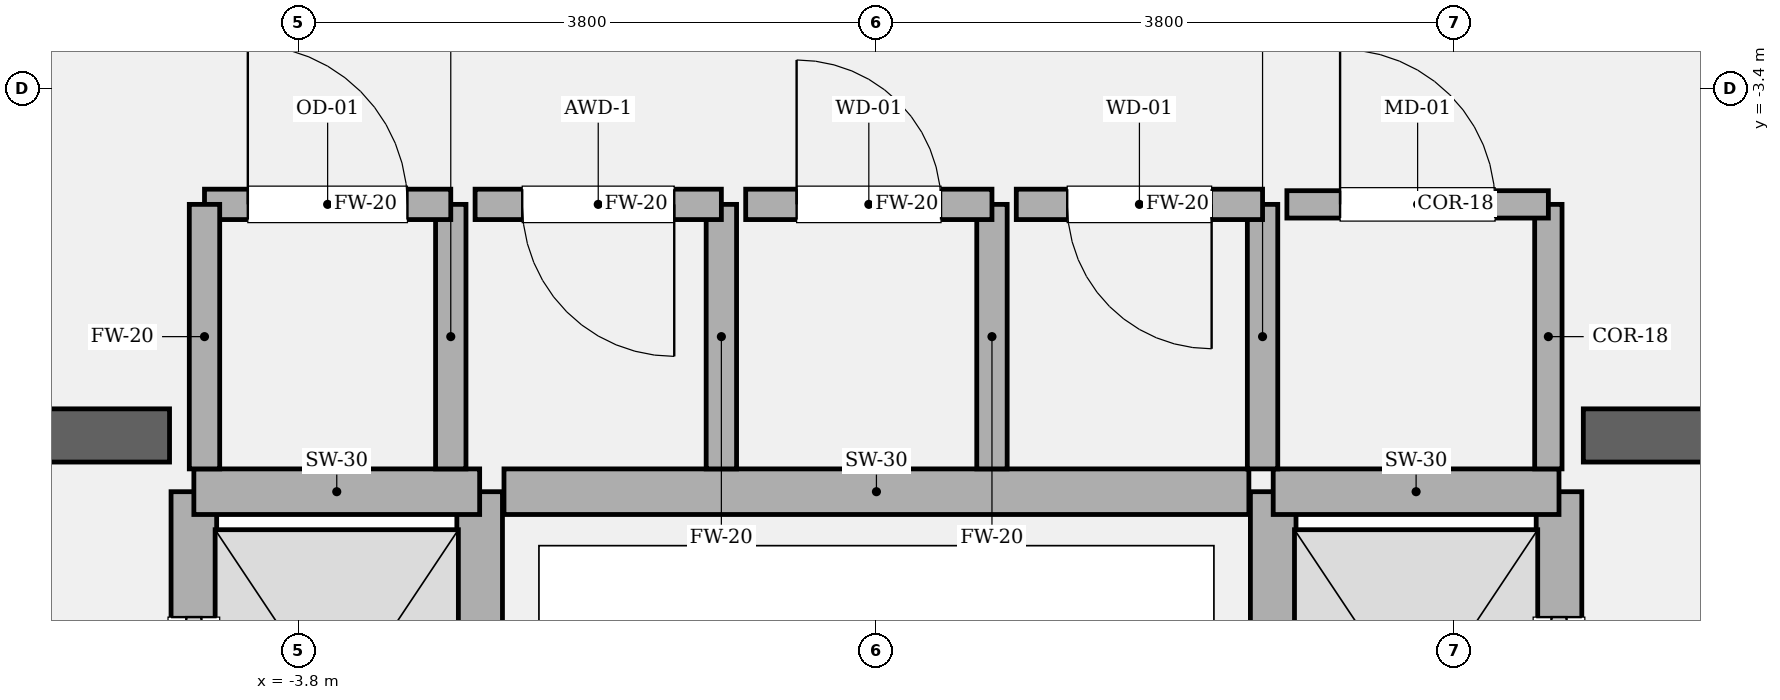
"""IFC4 building model, lengths in metres.
Left out: names, types, materials, properties, quantities, classifications, styles, units other than length and angle.
Written with IfcOpenShell. Run it as: python <this file> out.ifc"""

import sys

from ifc_helpers import new_model, si_unit, direction, frame, frame_2d, origin, place, context, subcontext, project, spatial, rectangle, extrude, element, fill, save


model = new_model("IFC4")
c1 = context("Model", 3, precision=1e-05, world=origin(), true_north=direction((0.0, 1.0)))
c2 = subcontext(c1, "Body", "Model", "MODEL_VIEW")
j1 = project(units=[si_unit("LENGTHUNIT", "METRE"), si_unit("PLANEANGLEUNIT", "RADIAN")], contexts=[c1])
p1 = place(None, origin())
s1 = spatial("IfcSite", under=j1, at=p1, CompositionType="ELEMENT")
p2 = place(p1, origin())
s2 = spatial("IfcBuilding", under=s1, at=p2, CompositionType="ELEMENT")
p3 = place(p2, frame((0.0, 0.0, 80.85)))
s3 = spatial("IfcBuildingStorey", under=s2, at=p3, CompositionType="ELEMENT", Elevation=80.85)
p4 = place(p3, frame((-9.825, -5.68, 0.0), z_axis=(0.0, 0.0, 1.0), x_axis=(1.0, 0.0, 0.0)))
e1 = element("IfcWall", 1, at=p4, inside=s3, PredefinedType="SOLIDWALL", context=c2, shape_type="SweptSolid", body=[
    extrude(rectangle(XDim=5.175, YDim=0.35, at=frame_2d((2.587, 0.0))), origin(), (0.0, 0.0, 1.0), 4.05),
])
p5 = place(p4, frame((1.285, 0.0, 0.0)))
e2 = element("IfcOpeningElement", 2, at=p5, cuts=e1, PredefinedType="OPENING", context=c2, shape_type="SweptSolid", body=[
    extrude(rectangle(XDim=1.18, YDim=2.2, at=frame_2d((0.59, 1.1))), frame((0.0, 0.185, 0.0), z_axis=(0.0, -1.0, 0.0), x_axis=(1.0, 0.0, 0.0)), (0.0, 0.0, 1.0), 0.37),
])
p6 = place(p3, frame((4.65, -5.68, 0.0), z_axis=(0.0, 0.0, 1.0), x_axis=(1.0, 0.0, 0.0)))
e3 = element("IfcWall", 3, at=p6, inside=s3, PredefinedType="SOLIDWALL", context=c2, shape_type="SweptSolid", body=[
    extrude(rectangle(XDim=5.175, YDim=0.35, at=frame_2d((2.587, 0.0))), origin(), (0.0, 0.0, 1.0), 4.05),
])
p7 = place(p6, frame((2.71, 0.0, 0.0)))
e4 = element("IfcOpeningElement", 4, at=p7, cuts=e3, PredefinedType="OPENING", context=c2, shape_type="SweptSolid", body=[
    extrude(rectangle(XDim=1.18, YDim=2.2, at=frame_2d((0.59, 1.1))), frame((0.0, 0.185, 0.0), z_axis=(0.0, -1.0, 0.0), x_axis=(1.0, 0.0, 0.0)), (0.0, 0.0, 1.0), 0.37),
])
p8 = place(p3, frame((-4.49, -8.82, 0.0), z_axis=(0.0, 0.0, 1.0), x_axis=(0.0, 1.0, 0.0)))
e5 = element("IfcWall", 5, at=p8, inside=s3, PredefinedType="SOLIDWALL", context=c2, shape_type="SweptSolid", body=[
    extrude(rectangle(XDim=2.77, YDim=0.3, at=frame_2d((1.385, 0.0))), origin(), (0.0, 0.0, 1.0), 3.81),
])
p9 = place(p8, frame((0.825, 0.0, 0.0)))
e6 = element("IfcOpeningElement", 6, at=p9, cuts=e5, PredefinedType="OPENING", context=c2, shape_type="SweptSolid", body=[
    extrude(rectangle(XDim=1.12, YDim=2.25, at=frame_2d((0.56, 1.125))), frame((0.0, 0.16, 0.0), z_axis=(0.0, -1.0, 0.0), x_axis=(1.0, 0.0, 0.0)), (0.0, 0.0, 1.0), 0.32),
])
p10 = place(p3, frame((-2.61, -8.82, 0.0), z_axis=(0.0, 0.0, 1.0), x_axis=(0.0, 1.0, 0.0)))
e7 = element("IfcWall", 7, at=p10, inside=s3, PredefinedType="SOLIDWALL", context=c2, shape_type="SweptSolid", body=[
    extrude(rectangle(XDim=2.77, YDim=0.3, at=frame_2d((1.385, 0.0))), origin(), (0.0, 0.0, 1.0), 3.81),
])
p11 = place(p3, frame((-4.49, -6.05, 0.0), z_axis=(0.0, 0.0, 1.0), x_axis=(1.0, 0.0, 0.0)))
e8 = element("IfcWall", 8, at=p11, inside=s3, PredefinedType="SOLIDWALL", context=c2, shape_type="SweptSolid", body=[
    extrude(rectangle(XDim=1.88, YDim=0.3, at=frame_2d((0.94, 0.0))), origin(), (0.0, 0.0, 1.0), 3.81),
])
p12 = place(p3, frame((4.49, -8.82, 0.0), z_axis=(0.0, 0.0, 1.0), x_axis=(0.0, 1.0, 0.0)))
e9 = element("IfcWall", 9, at=p12, inside=s3, PredefinedType="SOLIDWALL", context=c2, shape_type="SweptSolid", body=[
    extrude(rectangle(XDim=2.77, YDim=0.3, at=frame_2d((1.385, 0.0))), origin(), (0.0, 0.0, 1.0), 3.81),
])
p13 = place(p12, frame((0.825, 0.0, 0.0)))
e10 = element("IfcOpeningElement", 10, at=p13, cuts=e9, PredefinedType="OPENING", context=c2, shape_type="SweptSolid", body=[
    extrude(rectangle(XDim=1.12, YDim=2.25, at=frame_2d((0.56, 1.125))), frame((0.0, 0.16, 0.0), z_axis=(0.0, -1.0, 0.0), x_axis=(1.0, 0.0, 0.0)), (0.0, 0.0, 1.0), 0.32),
])
p14 = place(p3, frame((2.61, -8.82, 0.0), z_axis=(0.0, 0.0, 1.0), x_axis=(0.0, 1.0, 0.0)))
e11 = element("IfcWall", 11, at=p14, inside=s3, PredefinedType="SOLIDWALL", context=c2, shape_type="SweptSolid", body=[
    extrude(rectangle(XDim=2.77, YDim=0.3, at=frame_2d((1.385, 0.0))), origin(), (0.0, 0.0, 1.0), 3.81),
])
p15 = place(p3, frame((2.61, -6.05, 0.0), z_axis=(0.0, 0.0, 1.0), x_axis=(1.0, 0.0, 0.0)))
e12 = element("IfcWall", 12, at=p15, inside=s3, PredefinedType="SOLIDWALL", context=c2, shape_type="SweptSolid", body=[
    extrude(rectangle(XDim=1.88, YDim=0.3, at=frame_2d((0.94, 0.0))), origin(), (0.0, 0.0, 1.0), 3.81),
])
p16 = place(p3, frame((-2.45, -6.05, 0.0), z_axis=(0.0, 0.0, 1.0), x_axis=(1.0, 0.0, 0.0)))
e13 = element("IfcWall", 13, at=p16, inside=s3, PredefinedType="SOLIDWALL", context=c2, shape_type="SweptSolid", body=[
    extrude(rectangle(XDim=4.9, YDim=0.3, at=frame_2d((2.45, 0.0))), origin(), (0.0, 0.0, 1.0), 3.81),
])
p17 = place(p3, frame((-2.8, -5.9, 0.0), z_axis=(0.0, 0.0, 1.0), x_axis=(0.0, 1.0, 0.0)))
e14 = element("IfcWall", 14, at=p17, inside=s3, PredefinedType="SOLIDWALL", context=c2, shape_type="SweptSolid", body=[
    extrude(rectangle(XDim=1.74, YDim=0.2, at=frame_2d((0.87, 0.0))), origin(), (0.0, 0.0, 1.0), 3.81),
])
p18 = place(p3, frame((-2.8, -4.16, 0.0), z_axis=(0.0, 0.0, 1.0), x_axis=(-1.0, 0.0, 0.0)))
e15 = element("IfcWall", 15, at=p18, inside=s3, PredefinedType="SOLIDWALL", context=c2, shape_type="SweptSolid", body=[
    extrude(rectangle(XDim=1.62, YDim=0.2, at=frame_2d((0.81, 0.0))), origin(), (0.0, 0.0, 1.0), 3.81),
])
p19 = place(p18, frame((0.285, 0.0, 0.0)))
e16 = element("IfcOpeningElement", 16, at=p19, cuts=e15, PredefinedType="OPENING", context=c2, shape_type="SweptSolid", body=[
    extrude(rectangle(XDim=1.05, YDim=2.2, at=frame_2d((0.525, 1.1))), frame((0.0, 0.11, 0.0), z_axis=(0.0, -1.0, 0.0), x_axis=(1.0, 0.0, 0.0)), (0.0, 0.0, 1.0), 0.22),
])
for number, where, z_axis, x_axis in (
    (17, (-4.42, -4.16, 0.0), (0.0, 0.0, 1.0), (0.0, -1.0, 0.0)),
    (18, (-1.02, -5.9, 0.0), (0.0, 0.0, 1.0), (0.0, 1.0, 0.0)),
):
    element("IfcWall", number, at=place(p3, frame(where, z_axis=z_axis, x_axis=x_axis)), inside=s3, PredefinedType="SOLIDWALL", context=c2, shape_type="SweptSolid", body=[
        extrude(rectangle(XDim=1.74, YDim=0.2, at=frame_2d((0.87, 0.0))), origin(), (0.0, 0.0, 1.0), 3.81),
    ])
p20 = place(p3, frame((-1.02, -4.16, 0.0), z_axis=(0.0, 0.0, 1.0), x_axis=(-1.0, 0.0, 0.0)))
e19 = element("IfcWall", 19, at=p20, inside=s3, PredefinedType="SOLIDWALL", context=c2, shape_type="SweptSolid", body=[
    extrude(rectangle(XDim=1.62, YDim=0.2, at=frame_2d((0.81, 0.0))), origin(), (0.0, 0.0, 1.0), 3.81),
])
p21 = place(p20, frame((0.31, 0.0, 0.0)))
e20 = element("IfcOpeningElement", 20, at=p21, cuts=e19, PredefinedType="OPENING", context=c2, shape_type="SweptSolid", body=[
    extrude(rectangle(XDim=1.0, YDim=2.15, at=frame_2d((0.5, 1.075))), frame((0.0, 0.11, 0.0), z_axis=(0.0, -1.0, 0.0), x_axis=(1.0, 0.0, 0.0)), (0.0, 0.0, 1.0), 0.22),
])
p22 = place(p3, frame((0.76, -5.9, 0.0), z_axis=(0.0, 0.0, 1.0), x_axis=(0.0, 1.0, 0.0)))
e21 = element("IfcWall", 21, at=p22, inside=s3, PredefinedType="SOLIDWALL", context=c2, shape_type="SweptSolid", body=[
    extrude(rectangle(XDim=1.74, YDim=0.2, at=frame_2d((0.87, 0.0))), origin(), (0.0, 0.0, 1.0), 3.81),
])
p23 = place(p3, frame((0.76, -4.16, 0.0), z_axis=(0.0, 0.0, 1.0), x_axis=(-1.0, 0.0, 0.0)))
e22 = element("IfcWall", 22, at=p23, inside=s3, PredefinedType="SOLIDWALL", context=c2, shape_type="SweptSolid", body=[
    extrude(rectangle(XDim=1.62, YDim=0.2, at=frame_2d((0.81, 0.0))), origin(), (0.0, 0.0, 1.0), 3.81),
])
p24 = place(p23, frame((0.335, 0.0, 0.0)))
e23 = element("IfcOpeningElement", 23, at=p24, cuts=e22, PredefinedType="OPENING", context=c2, shape_type="SweptSolid", body=[
    extrude(rectangle(XDim=0.95, YDim=2.15, at=frame_2d((0.475, 1.075))), frame((0.0, 0.11, 0.0), z_axis=(0.0, -1.0, 0.0), x_axis=(1.0, 0.0, 0.0)), (0.0, 0.0, 1.0), 0.22),
])
p25 = place(p3, frame((2.54, -5.9, 0.0), z_axis=(0.0, 0.0, 1.0), x_axis=(0.0, 1.0, 0.0)))
e24 = element("IfcWall", 24, at=p25, inside=s3, PredefinedType="SOLIDWALL", context=c2, shape_type="SweptSolid", body=[
    extrude(rectangle(XDim=1.74, YDim=0.2, at=frame_2d((0.87, 0.0))), origin(), (0.0, 0.0, 1.0), 3.81),
])
p26 = place(p3, frame((2.54, -4.16, 0.0), z_axis=(0.0, 0.0, 1.0), x_axis=(-1.0, 0.0, 0.0)))
e25 = element("IfcWall", 25, at=p26, inside=s3, PredefinedType="SOLIDWALL", context=c2, shape_type="SweptSolid", body=[
    extrude(rectangle(XDim=1.62, YDim=0.2, at=frame_2d((0.81, 0.0))), origin(), (0.0, 0.0, 1.0), 3.81),
])
p27 = place(p26, frame((0.335, 0.0, 0.0)))
e26 = element("IfcOpeningElement", 26, at=p27, cuts=e25, PredefinedType="OPENING", context=c2, shape_type="SweptSolid", body=[
    extrude(rectangle(XDim=0.95, YDim=2.15, at=frame_2d((0.475, 1.075))), frame((0.0, 0.11, 0.0), z_axis=(0.0, -1.0, 0.0), x_axis=(1.0, 0.0, 0.0)), (0.0, 0.0, 1.0), 0.22),
])
p28 = place(p3, frame((4.42, -5.9, 0.0), z_axis=(0.0, 0.0, 1.0), x_axis=(0.0, 1.0, 0.0)))
e27 = element("IfcWall", 27, at=p28, inside=s3, PredefinedType="PARTITIONING", context=c2, shape_type="SweptSolid", body=[
    extrude(rectangle(XDim=1.74, YDim=0.18, at=frame_2d((0.87, 0.0))), origin(), (0.0, 0.0, 1.0), 3.81),
])
p29 = place(p3, frame((4.42, -4.16, 0.0), z_axis=(0.0, 0.0, 1.0), x_axis=(-1.0, 0.0, 0.0)))
e28 = element("IfcWall", 28, at=p29, inside=s3, PredefinedType="PARTITIONING", context=c2, shape_type="SweptSolid", body=[
    extrude(rectangle(XDim=1.72, YDim=0.18, at=frame_2d((0.86, 0.0))), origin(), (0.0, 0.0, 1.0), 3.81),
])
p30 = place(p29, frame((0.35, 0.0, 0.0)))
e29 = element("IfcOpeningElement", 29, at=p30, cuts=e28, PredefinedType="OPENING", context=c2, shape_type="SweptSolid", body=[
    extrude(rectangle(XDim=1.02, YDim=2.2, at=frame_2d((0.51, 1.1))), frame((0.0, 0.1, 0.0), z_axis=(0.0, -1.0, 0.0), x_axis=(1.0, 0.0, 0.0)), (0.0, 0.0, 1.0), 0.2),
])
p31 = place(p9, origin())
e30 = element("IfcDoor", 30, at=p31, inside=s3, OperationType="SLIDING_TO_LEFT", PredefinedType="DOOR", context=c2, shape_type="SweptSolid", body=[
    extrude(rectangle(XDim=1.12, YDim=2.25, at=frame_2d((0.56, 1.125))), frame((0.0, 0.025, 0.0), z_axis=(0.0, -1.0, 0.0), x_axis=(1.0, 0.0, 0.0)), (0.0, 0.0, 1.0), 0.05),
])
fill(e6, e30)
p32 = place(p13, origin())
e31 = element("IfcDoor", 31, at=p32, inside=s3, OperationType="SLIDING_TO_RIGHT", PredefinedType="DOOR", context=c2, shape_type="SweptSolid", body=[
    extrude(rectangle(XDim=1.12, YDim=2.25, at=frame_2d((0.56, 1.125))), frame((0.0, 0.025, 0.0), z_axis=(0.0, -1.0, 0.0), x_axis=(1.0, 0.0, 0.0)), (0.0, 0.0, 1.0), 0.05),
])
fill(e10, e31)
p33 = place(p19, origin())
e32 = element("IfcDoor", 32, at=p33, inside=s3, OperationType="SINGLE_SWING_RIGHT", PredefinedType="DOOR", context=c2, shape_type="SweptSolid", body=[
    extrude(rectangle(XDim=1.05, YDim=2.2, at=frame_2d((0.525, 1.1))), frame((0.0, 0.025, 0.0), z_axis=(0.0, -1.0, 0.0), x_axis=(1.0, 0.0, 0.0)), (0.0, 0.0, 1.0), 0.05),
])
fill(e16, e32)
p34 = place(p21, origin())
e33 = element("IfcDoor", 33, at=p34, inside=s3, OperationType="SINGLE_SWING_LEFT", PredefinedType="DOOR", context=c2, shape_type="SweptSolid", body=[
    extrude(rectangle(XDim=1.0, YDim=2.15, at=frame_2d((0.5, 1.075))), frame((0.0, 0.025, 0.0), z_axis=(0.0, -1.0, 0.0), x_axis=(1.0, 0.0, 0.0)), (0.0, 0.0, 1.0), 0.05),
])
fill(e20, e33)
p35 = place(p24, origin())
e34 = element("IfcDoor", 34, at=p35, inside=s3, OperationType="SINGLE_SWING_RIGHT", PredefinedType="DOOR", context=c2, shape_type="SweptSolid", body=[
    extrude(rectangle(XDim=0.95, YDim=2.15, at=frame_2d((0.475, 1.075))), frame((0.0, 0.025, 0.0), z_axis=(0.0, -1.0, 0.0), x_axis=(1.0, 0.0, 0.0)), (0.0, 0.0, 1.0), 0.05),
])
fill(e23, e34)
p36 = place(p27, origin())
e35 = element("IfcDoor", 35, at=p36, inside=s3, OperationType="SINGLE_SWING_LEFT", PredefinedType="DOOR", context=c2, shape_type="SweptSolid", body=[
    extrude(rectangle(XDim=0.95, YDim=2.15, at=frame_2d((0.475, 1.075))), frame((0.0, 0.025, 0.0), z_axis=(0.0, -1.0, 0.0), x_axis=(1.0, 0.0, 0.0)), (0.0, 0.0, 1.0), 0.05),
])
fill(e26, e35)
p37 = place(p30, origin())
e36 = element("IfcDoor", 36, at=p37, inside=s3, OperationType="SINGLE_SWING_RIGHT", PredefinedType="DOOR", context=c2, shape_type="SweptSolid", body=[
    extrude(rectangle(XDim=1.02, YDim=2.2, at=frame_2d((0.51, 1.1))), frame((0.0, 0.025, 0.0), z_axis=(0.0, -1.0, 0.0), x_axis=(1.0, 0.0, 0.0)), (0.0, 0.0, 1.0), 0.05),
])
fill(e29, e36)
save(model, sys.argv[1])
